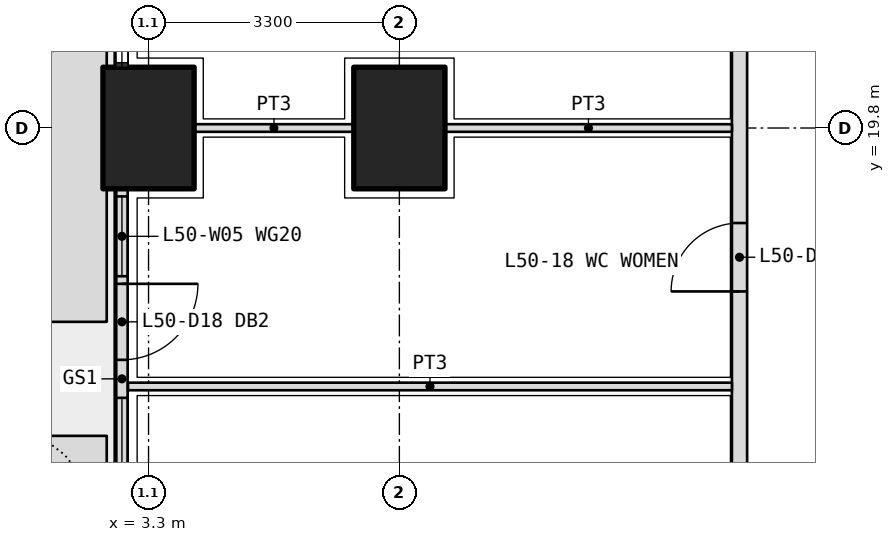
"""IFC4 building model, lengths in metres.
Left out: names, types, materials, properties, quantities, classifications, styles, units other than length and angle.
Written with IfcOpenShell. Run it as: python <this file> out.ifc"""

import sys

from ifc_helpers import new_model, si_unit, direction, frame, frame_2d, origin, origin_2d, place, context, subcontext, project, spatial, polyline, rectangle, outline, extrude, element, fill, save


model = new_model("IFC4")
c1 = context("Model", 3, precision=1e-05, world=origin(), true_north=direction((0.0, 1.0)))
c2 = subcontext(c1, "Body", "Model", "MODEL_VIEW")
j1 = project(units=[si_unit("LENGTHUNIT", "METRE"), si_unit("PLANEANGLEUNIT", "RADIAN")], contexts=[c1])
p1 = place(None, origin())
s1 = spatial("IfcSite", under=j1, at=p1, CompositionType="ELEMENT")
p2 = place(p1, origin())
s2 = spatial("IfcBuilding", under=s1, at=p2, CompositionType="ELEMENT")
p3 = place(p2, frame((0.0, 0.0, 218.7)))
s3 = spatial("IfcBuildingStorey", under=s2, at=p3, CompositionType="ELEMENT", Elevation=218.7)
for number, where, z_axis, x_axis in (
    (1, (3.3, 19.8, 0.0), (0.0, 0.0, 1.0), (0.0, 1.0, 0.0)),
    (2, (6.6, 19.8, 0.0), (0.0, 0.0, 1.0), (0.0, 1.0, 0.0)),
):
    element("IfcColumn", number, at=place(p3, frame(where, z_axis=z_axis, x_axis=x_axis)), inside=s3, PredefinedType="COLUMN", context=c2, shape_type="SweptSolid", body=[
        extrude(rectangle(XDim=1.6, YDim=1.2, at=origin_2d()), origin(), (0.0, 0.0, 1.0), 4.2),
    ])
p4 = place(p3, origin())
e3 = element("IfcWall", 3, at=p4, inside=s3, PredefinedType="USERDEFINED", context=c2, shape_type="SweptSolid", body=[
    extrude(outline(polyline([(1.75, 13.3), (2.75, 13.3), (2.75, 15.75), (1.75, 15.75), (1.75, 13.3)]), holes=[polyline([(1.9, 13.45), (2.6, 13.45), (2.6, 15.6), (1.9, 15.6), (1.9, 13.45)])]), origin(), (0.0, 0.0, 1.0), 1.05),
])
p5 = place(p3, origin())
e4 = element("IfcWall", 4, at=p5, inside=s3, PredefinedType="USERDEFINED", context=c2, shape_type="SweptSolid", body=[
    extrude(outline(polyline([(1.75, 17.25), (2.75, 17.25), (2.75, 26.3), (1.75, 26.3), (1.75, 17.25)]), holes=[polyline([(1.9, 17.4), (2.6, 17.4), (2.6, 26.15), (1.9, 26.15), (1.9, 17.4)])]), origin(), (0.0, 0.0, 1.0), 1.05),
])
p6 = place(p3, frame((2.95, 19.0, 0.0), z_axis=(0.0, 0.0, 1.0), x_axis=(0.0, -1.0, 0.0)))
e5 = element("IfcWall", 5, at=p6, inside=s3, PredefinedType="SOLIDWALL", context=c2, shape_type="SweptSolid", body=[
    extrude(rectangle(XDim=5.0, YDim=0.15, at=frame_2d((2.5, 0.0))), origin(), (0.0, 0.0, 1.0), 2.05),
])
p7 = place(p6, frame((1.25, 0.0, 0.0)))
e6 = element("IfcOpeningElement", 6, at=p7, cuts=e5, PredefinedType="OPENING", context=c2, shape_type="SweptSolid", body=[
    extrude(rectangle(XDim=1.0, YDim=2.0, at=frame_2d((0.5, 1.0))), frame((0.0, 0.085, 0.0), z_axis=(0.0, -1.0, 0.0), x_axis=(1.0, 0.0, 0.0)), (0.0, 0.0, 1.0), 0.17),
])
p8 = place(p6, frame((0.1, 0.0, 0.1)))
e7 = element("IfcOpeningElement", 7, at=p8, cuts=e5, PredefinedType="OPENING", context=c2, shape_type="SweptSolid", body=[
    extrude(rectangle(XDim=1.05, YDim=1.65, at=frame_2d((0.525, 0.825))), frame((0.0, 0.085, 0.0), z_axis=(0.0, -1.0, 0.0), x_axis=(1.0, 0.0, 0.0)), (0.0, 0.0, 1.0), 0.17),
])
p9 = place(p6, frame((2.75, 0.0, 0.1)))
e8 = element("IfcOpeningElement", 8, at=p9, cuts=e5, PredefinedType="OPENING", context=c2, shape_type="SweptSolid", body=[
    extrude(rectangle(XDim=2.15, YDim=1.65, at=frame_2d((1.075, 0.825))), frame((0.0, 0.085, 0.0), z_axis=(0.0, -1.0, 0.0), x_axis=(1.0, 0.0, 0.0)), (0.0, 0.0, 1.0), 0.17),
])
p10 = place(p3, frame((11.075, 11.175, 0.0), z_axis=(0.0, 0.0, 1.0), x_axis=(0.0, 1.0, 0.0)))
e9 = element("IfcWall", 9, at=p10, inside=s3, PredefinedType="PARTITIONING", context=c2, shape_type="SweptSolid", body=[
    extrude(rectangle(XDim=23.85, YDim=0.2, at=frame_2d((11.925, 0.0))), origin(), (0.0, 0.0, 1.0), 2.55),
])
p11 = place(p10, frame((0.462, 0.0, 0.0)))
e10 = element("IfcOpeningElement", 10, at=p11, cuts=e9, PredefinedType="OPENING", context=c2, shape_type="SweptSolid", body=[
    extrude(rectangle(XDim=1.0, YDim=2.1, at=frame_2d((0.5, 1.05))), frame((0.0, 0.11, 0.0), z_axis=(0.0, -1.0, 0.0), x_axis=(1.0, 0.0, 0.0)), (0.0, 0.0, 1.0), 0.22),
])
p12 = place(p10, frame((3.125, 0.0, 0.0)))
e11 = element("IfcOpeningElement", 11, at=p12, cuts=e9, PredefinedType="OPENING", context=c2, shape_type="SweptSolid", body=[
    extrude(rectangle(XDim=1.0, YDim=2.1, at=frame_2d((0.5, 1.05))), frame((0.0, 0.11, 0.0), z_axis=(0.0, -1.0, 0.0), x_axis=(1.0, 0.0, 0.0)), (0.0, 0.0, 1.0), 0.22),
])
p13 = place(p10, frame((6.475, 0.0, 0.0)))
e12 = element("IfcOpeningElement", 12, at=p13, cuts=e9, PredefinedType="OPENING", context=c2, shape_type="SweptSolid", body=[
    extrude(rectangle(XDim=0.9, YDim=2.1, at=frame_2d((0.45, 1.05))), frame((0.0, 0.11, 0.0), z_axis=(0.0, -1.0, 0.0), x_axis=(1.0, 0.0, 0.0)), (0.0, 0.0, 1.0), 0.22),
])
p14 = place(p10, frame((9.675, 0.0, 0.0)))
e13 = element("IfcOpeningElement", 13, at=p14, cuts=e9, PredefinedType="OPENING", context=c2, shape_type="SweptSolid", body=[
    extrude(rectangle(XDim=0.9, YDim=2.1, at=frame_2d((0.45, 1.05))), frame((0.0, 0.11, 0.0), z_axis=(0.0, -1.0, 0.0), x_axis=(1.0, 0.0, 0.0)), (0.0, 0.0, 1.0), 0.22),
])
p15 = place(p10, frame((12.925, 0.0, 0.0)))
e14 = element("IfcOpeningElement", 14, at=p15, cuts=e9, PredefinedType="OPENING", context=c2, shape_type="SweptSolid", body=[
    extrude(rectangle(XDim=1.0, YDim=2.1, at=frame_2d((0.5, 1.05))), frame((0.0, 0.11, 0.0), z_axis=(0.0, -1.0, 0.0), x_axis=(1.0, 0.0, 0.0)), (0.0, 0.0, 1.0), 0.22),
])
p16 = place(p10, frame((19.087, 0.0, 0.0)))
e15 = element("IfcOpeningElement", 15, at=p16, cuts=e9, PredefinedType="OPENING", context=c2, shape_type="SweptSolid", body=[
    extrude(rectangle(XDim=1.0, YDim=2.1, at=frame_2d((0.5, 1.05))), frame((0.0, 0.11, 0.0), z_axis=(0.0, -1.0, 0.0), x_axis=(1.0, 0.0, 0.0)), (0.0, 0.0, 1.0), 0.22),
])
p17 = place(p3, frame((3.03, 16.4, 0.0), z_axis=(0.0, 0.0, 1.0), x_axis=(1.0, 0.0, 0.0)))
e16 = element("IfcWall", 16, at=p17, inside=s3, PredefinedType="PARTITIONING", context=c2, shape_type="SweptSolid", body=[
    extrude(rectangle(XDim=7.945, YDim=0.1, at=frame_2d((3.973, 0.0))), origin(), (0.0, 0.0, 1.0), 3.85),
])
p18 = place(p3, frame((3.9, 19.8, 0.0), z_axis=(0.0, 0.0, 1.0), x_axis=(1.0, 0.0, 0.0)))
e17 = element("IfcWall", 17, at=p18, inside=s3, PredefinedType="PARTITIONING", context=c2, shape_type="SweptSolid", body=[
    extrude(rectangle(XDim=2.1, YDim=0.1, at=frame_2d((1.05, 0.0))), origin(), (0.0, 0.0, 1.0), 2.55),
])
p19 = place(p3, frame((7.2, 19.8, 0.0), z_axis=(0.0, 0.0, 1.0), x_axis=(1.0, 0.0, 0.0)))
e18 = element("IfcWall", 18, at=p19, inside=s3, PredefinedType="PARTITIONING", context=c2, shape_type="SweptSolid", body=[
    extrude(rectangle(XDim=3.775, YDim=0.1, at=frame_2d((1.888, 0.0))), origin(), (0.0, 0.0, 1.0), 2.55),
])
p20 = place(p7, origin())
e19 = element("IfcDoor", 19, at=p20, inside=s3, OperationType="SINGLE_SWING_LEFT", PredefinedType="DOOR", context=c2, shape_type="SweptSolid", body=[
    extrude(rectangle(XDim=1.0, YDim=2.0, at=frame_2d((0.5, 1.0))), frame((0.0, 0.025, 0.0), z_axis=(0.0, -1.0, 0.0), x_axis=(1.0, 0.0, 0.0)), (0.0, 0.0, 1.0), 0.05),
])
fill(e6, e19)
p21 = place(p8, origin())
e20 = element("IfcWindow", 20, at=p21, inside=s3, PartitioningType="SINGLE_PANEL", PredefinedType="WINDOW", context=c2, shape_type="SweptSolid", body=[
    extrude(rectangle(XDim=1.05, YDim=1.65, at=frame_2d((0.525, 0.825))), frame((0.0, 0.03, 0.0), z_axis=(0.0, -1.0, 0.0), x_axis=(1.0, 0.0, 0.0)), (0.0, 0.0, 1.0), 0.06),
])
fill(e7, e20)
p22 = place(p9, origin())
e21 = element("IfcWindow", 21, at=p22, inside=s3, PartitioningType="SINGLE_PANEL", PredefinedType="WINDOW", context=c2, shape_type="SweptSolid", body=[
    extrude(rectangle(XDim=2.15, YDim=1.65, at=frame_2d((1.075, 0.825))), frame((0.0, 0.03, 0.0), z_axis=(0.0, -1.0, 0.0), x_axis=(1.0, 0.0, 0.0)), (0.0, 0.0, 1.0), 0.06),
])
fill(e8, e21)
p23 = place(p13, origin())
e22 = element("IfcDoor", 22, at=p23, inside=s3, OperationType="SINGLE_SWING_LEFT", PredefinedType="DOOR", context=c2, shape_type="SweptSolid", body=[
    extrude(rectangle(XDim=0.9, YDim=2.1, at=frame_2d((0.45, 1.05))), frame((0.0, 0.025, 0.0), z_axis=(0.0, -1.0, 0.0), x_axis=(1.0, 0.0, 0.0)), (0.0, 0.0, 1.0), 0.05),
])
fill(e12, e22)
save(model, sys.argv[1])
